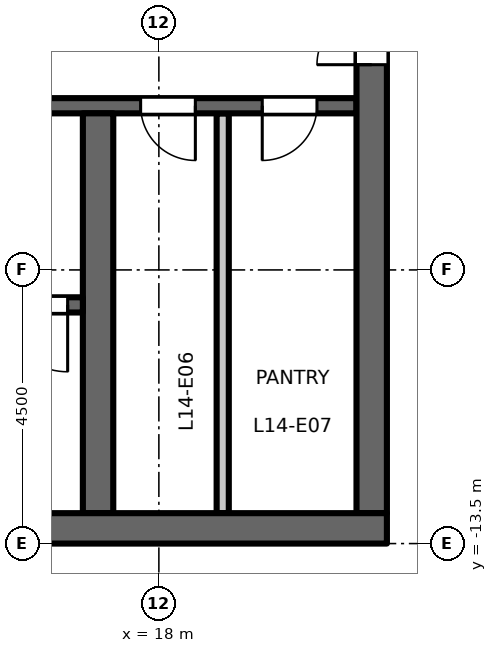
"""IFC4 building model, lengths in metres.
Left out: names, types, materials, properties, quantities, classifications, styles, units other than length and angle.
Written with IfcOpenShell. Run it as: python <this file> out.ifc"""

import sys

from ifc_helpers import new_model, si_unit, direction, frame, frame_2d, origin, place, context, subcontext, project, spatial, rectangle, extrude, element, fill, save


model = new_model("IFC4")
c1 = context("Model", 3, precision=1e-05, world=origin(), true_north=direction((0.0, 1.0)))
c2 = subcontext(c1, "Body", "Model", "MODEL_VIEW")
j1 = project(units=[si_unit("LENGTHUNIT", "METRE"), si_unit("PLANEANGLEUNIT", "RADIAN")], contexts=[c1])
p1 = place(None, origin())
s1 = spatial("IfcSite", under=j1, at=p1, CompositionType="ELEMENT")
p2 = place(p1, origin())
s2 = spatial("IfcBuilding", under=s1, at=p2, CompositionType="ELEMENT")
p3 = place(p2, frame((0.0, 0.0, 67.2)))
s3 = spatial("IfcBuildingStorey", under=s2, at=p3, CompositionType="ELEMENT", Elevation=67.2)
p4 = place(p3, frame((12.15, -6.3, 0.0), z_axis=(0.0, 0.0, 1.0), x_axis=(1.0, 0.0, 0.0)))
e1 = element("IfcWall", 1, at=p4, inside=s3, PredefinedType="SHEAR", context=c2, shape_type="SweptSolid", body=[
    extrude(rectangle(XDim=9.1, YDim=0.25, at=frame_2d((4.55, 0.0))), origin(), (0.0, 0.0, 1.0), 4.35),
])
p5 = place(p4, frame((1.8, 0.0, 0.0)))
e2 = element("IfcOpeningElement", 2, at=p5, cuts=e1, PredefinedType="OPENING", context=c2, shape_type="SweptSolid", body=[
    extrude(rectangle(XDim=1.0, YDim=2.1, at=frame_2d((0.5, 1.05))), frame((0.0, 0.135, 0.0), z_axis=(0.0, -1.0, 0.0), x_axis=(1.0, 0.0, 0.0)), (0.0, 0.0, 1.0), 0.27),
])
p6 = place(p4, frame((5.55, 0.0, 0.0)))
e3 = element("IfcOpeningElement", 3, at=p6, cuts=e1, PredefinedType="OPENING", context=c2, shape_type="SweptSolid", body=[
    extrude(rectangle(XDim=0.9, YDim=2.1, at=frame_2d((0.45, 1.05))), frame((0.0, 0.135, 0.0), z_axis=(0.0, -1.0, 0.0), x_axis=(1.0, 0.0, 0.0)), (0.0, 0.0, 1.0), 0.27),
])
p7 = place(p4, frame((7.55, 0.0, 0.0)))
e4 = element("IfcOpeningElement", 4, at=p7, cuts=e1, PredefinedType="OPENING", context=c2, shape_type="SweptSolid", body=[
    extrude(rectangle(XDim=0.9, YDim=2.1, at=frame_2d((0.45, 1.05))), frame((0.0, 0.135, 0.0), z_axis=(0.0, -1.0, 0.0), x_axis=(1.0, 0.0, 0.0)), (0.0, 0.0, 1.0), 0.27),
])
p8 = place(p3, frame((21.5, -13.0, 0.0), z_axis=(0.0, 0.0, 1.0), x_axis=(0.0, 1.0, 0.0)))
e5 = element("IfcWall", 5, at=p8, inside=s3, PredefinedType="SHEAR", context=c2, shape_type="SweptSolid", body=[
    extrude(rectangle(XDim=26.0, YDim=0.5, at=frame_2d((13.0, 0.0))), origin(), (0.0, 0.0, 1.0), 4.35),
])
p9 = place(p8, frame((16.825, 0.0, 0.0)))
e6 = element("IfcOpeningElement", 6, at=p9, cuts=e5, PredefinedType="OPENING", context=c2, shape_type="SweptSolid", body=[
    extrude(rectangle(XDim=1.8, YDim=2.1, at=frame_2d((0.9, 1.05))), frame((0.0, 0.26, 0.0), z_axis=(0.0, -1.0, 0.0), x_axis=(1.0, 0.0, 0.0)), (0.0, 0.0, 1.0), 0.52),
])
p10 = place(p8, frame((7.375, 0.0, 0.0)))
e7 = element("IfcOpeningElement", 7, at=p10, cuts=e5, PredefinedType="OPENING", context=c2, shape_type="SweptSolid", body=[
    extrude(rectangle(XDim=1.8, YDim=2.1, at=frame_2d((0.9, 1.05))), frame((0.0, 0.26, 0.0), z_axis=(0.0, -1.0, 0.0), x_axis=(1.0, 0.0, 0.0)), (0.0, 0.0, 1.0), 0.52),
])
p11 = place(p8, frame((23.8, 0.0, 0.0)))
e8 = element("IfcOpeningElement", 8, at=p11, cuts=e5, PredefinedType="OPENING", context=c2, shape_type="SweptSolid", body=[
    extrude(rectangle(XDim=0.9, YDim=2.1, at=frame_2d((0.45, 1.05))), frame((0.0, 0.26, 0.0), z_axis=(0.0, -1.0, 0.0), x_axis=(1.0, 0.0, 0.0)), (0.0, 0.0, 1.0), 0.52),
])
p12 = place(p3, frame((19.05, -13.0, 0.0), z_axis=(0.0, 0.0, 1.0), x_axis=(0.0, 1.0, 0.0)))
e9 = element("IfcWall", 9, at=p12, inside=s3, PredefinedType="PARTITIONING", context=c2, shape_type="SweptSolid", body=[
    extrude(rectangle(XDim=6.575, YDim=0.2, at=frame_2d((3.288, 0.0))), origin(), (0.0, 0.0, 1.0), 4.35),
])
p13 = place(p3, frame((17.0, -13.0, 0.0), z_axis=(0.0, 0.0, 1.0), x_axis=(0.0, 1.0, 0.0)))
e10 = element("IfcWall", 10, at=p13, inside=s3, PredefinedType="SHEAR", context=c2, shape_type="SweptSolid", body=[
    extrude(rectangle(XDim=6.575, YDim=0.5, at=frame_2d((3.288, 0.0))), origin(), (0.0, 0.0, 1.0), 4.35),
])
p14 = place(p3, frame((8.75, -9.575, 0.0), z_axis=(0.0, 0.0, 1.0), x_axis=(1.0, 0.0, 0.0)))
e11 = element("IfcWall", 11, at=p14, inside=s3, PredefinedType="SHEAR", context=c2, shape_type="SweptSolid", body=[
    extrude(rectangle(XDim=8.0, YDim=0.25, at=frame_2d((4.0, 0.0))), origin(), (0.0, 0.0, 1.0), 4.35),
])
p15 = place(p14, frame((6.65, 0.0, 0.0)))
e12 = element("IfcOpeningElement", 12, at=p15, cuts=e11, PredefinedType="OPENING", context=c2, shape_type="SweptSolid", body=[
    extrude(rectangle(XDim=1.1, YDim=2.1, at=frame_2d((0.55, 1.05))), frame((0.0, 0.135, 0.0), z_axis=(0.0, -1.0, 0.0), x_axis=(1.0, 0.0, 0.0)), (0.0, 0.0, 1.0), 0.27),
])
p16 = place(p3, frame((8.25, -13.25, 0.0), z_axis=(0.0, 0.0, 1.0), x_axis=(1.0, 0.0, 0.0)))
e13 = element("IfcWall", 13, at=p16, inside=s3, PredefinedType="SHEAR", context=c2, shape_type="SweptSolid", body=[
    extrude(rectangle(XDim=13.5, YDim=0.5, at=frame_2d((6.75, 0.0))), origin(), (0.0, 0.0, 1.0), 4.35),
])
p17 = place(p15, origin())
e14 = element("IfcDoor", 14, at=p17, inside=s3, OperationType="SINGLE_SWING_RIGHT", PredefinedType="DOOR", context=c2, shape_type="SweptSolid", body=[
    extrude(rectangle(XDim=1.1, YDim=2.1, at=frame_2d((0.55, 1.05))), frame((0.0, 0.025, 0.0), z_axis=(0.0, -1.0, 0.0), x_axis=(1.0, 0.0, 0.0)), (0.0, 0.0, 1.0), 0.05),
])
fill(e12, e14)
p18 = place(p10, origin())
e15 = element("IfcDoor", 15, at=p18, inside=s3, OperationType="DOUBLE_DOOR_DOUBLE_SWING", PredefinedType="DOOR", context=c2, shape_type="SweptSolid", body=[
    extrude(rectangle(XDim=1.8, YDim=2.1, at=frame_2d((0.9, 1.05))), frame((0.0, 0.025, 0.0), z_axis=(0.0, -1.0, 0.0), x_axis=(1.0, 0.0, 0.0)), (0.0, 0.0, 1.0), 0.05),
])
fill(e7, e15)
p19 = place(p6, origin())
e16 = element("IfcDoor", 16, at=p19, inside=s3, OperationType="SINGLE_SWING_RIGHT", PredefinedType="DOOR", context=c2, shape_type="SweptSolid", body=[
    extrude(rectangle(XDim=0.9, YDim=2.1, at=frame_2d((0.45, 1.05))), frame((0.0, 0.025, 0.0), z_axis=(0.0, -1.0, 0.0), x_axis=(1.0, 0.0, 0.0)), (0.0, 0.0, 1.0), 0.05),
])
fill(e3, e16)
p20 = place(p7, origin())
e17 = element("IfcDoor", 17, at=p20, inside=s3, OperationType="SINGLE_SWING_LEFT", PredefinedType="DOOR", context=c2, shape_type="SweptSolid", body=[
    extrude(rectangle(XDim=0.9, YDim=2.1, at=frame_2d((0.45, 1.05))), frame((0.0, 0.025, 0.0), z_axis=(0.0, -1.0, 0.0), x_axis=(1.0, 0.0, 0.0)), (0.0, 0.0, 1.0), 0.05),
])
fill(e4, e17)
save(model, sys.argv[1])
